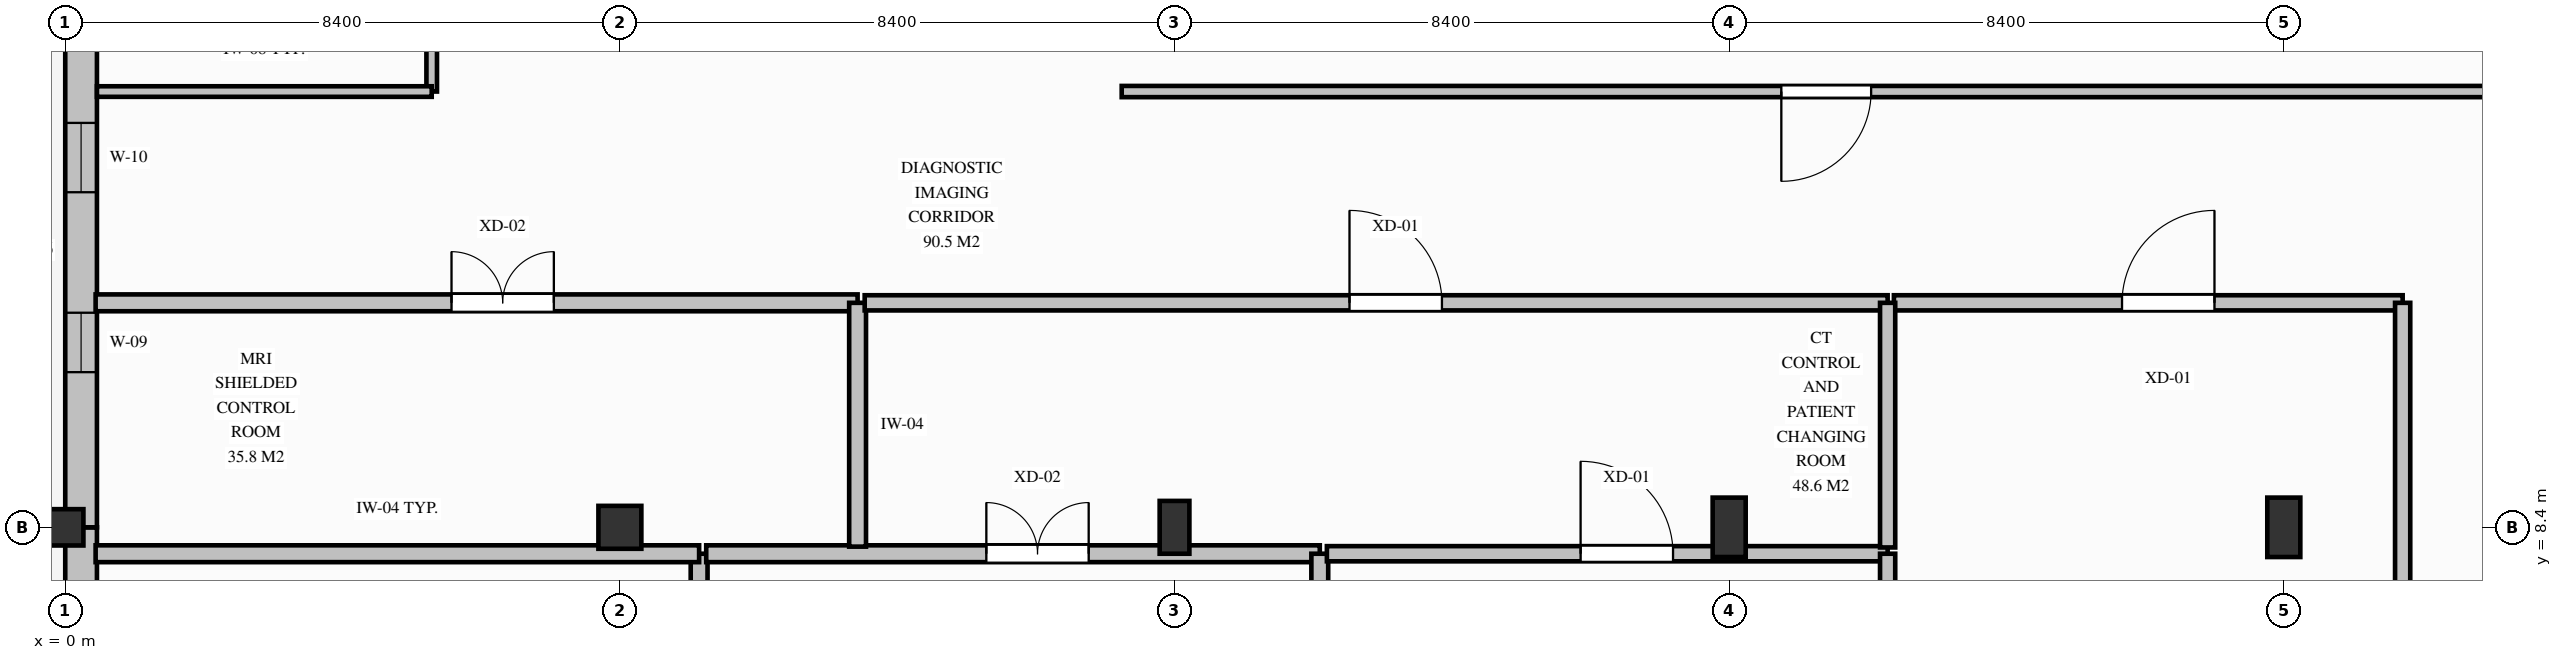
"""IFC4 building model, lengths in metres.
Left out: names, types, materials, properties, quantities, classifications, styles, units other than length and angle.
Written with IfcOpenShell. Run it as: python <this file> out.ifc"""

import sys

from ifc_helpers import new_model, si_unit, direction, frame, frame_2d, origin, origin_2d, place, context, subcontext, project, spatial, rectangle, circle, extrude, element, fill, save


model = new_model("IFC4")
c1 = context("Model", 3, precision=1e-05, world=origin(), true_north=direction((0.0, 1.0)))
c2 = subcontext(c1, "Body", "Model", "MODEL_VIEW")
j1 = project(units=[si_unit("LENGTHUNIT", "METRE"), si_unit("PLANEANGLEUNIT", "RADIAN")], contexts=[c1])
p1 = place(None, origin())
s1 = spatial("IfcSite", under=j1, at=p1, CompositionType="ELEMENT")
p2 = place(p1, origin())
s2 = spatial("IfcBuilding", under=s1, at=p2, CompositionType="ELEMENT")
p3 = place(p2, origin())
s3 = spatial("IfcBuildingStorey", under=s2, at=p3, CompositionType="ELEMENT", Elevation=0.0)
p4 = place(p3, frame((0.0, 8.4, 0.0), z_axis=(0.0, 0.0, 1.0), x_axis=(1.0, 0.0, 0.0)))
e1 = element("IfcColumn", 1, at=p4, inside=s3, PredefinedType="COLUMN", context=c2, shape_type="SweptSolid", body=[
    extrude(circle(Radius=0.275, at=origin_2d()), origin(), (0.0, 0.0, 1.0), 4.5),
])
p5 = place(p3, frame((8.4, 8.4, 0.0), z_axis=(0.0, 0.0, 1.0), x_axis=(1.0, 0.0, 0.0)))
e2 = element("IfcColumn", 2, at=p5, inside=s3, PredefinedType="COLUMN", context=c2, shape_type="SweptSolid", body=[
    extrude(circle(Radius=0.325, at=origin_2d()), origin(), (0.0, 0.0, 1.0), 4.5),
])
p6 = place(p3, frame((16.8, 8.4, 0.0), z_axis=(0.0, 0.0, 1.0), x_axis=(1.0, 0.0, 0.0)))
e3 = element("IfcColumn", 3, at=p6, inside=s3, PredefinedType="COLUMN", context=c2, shape_type="SweptSolid", body=[
    extrude(rectangle(XDim=0.45, YDim=0.8, at=origin_2d()), origin(), (0.0, 0.0, 1.0), 4.5),
])
for number, where, z_axis, x_axis in (
    (4, (25.2, 8.4, 0.0), (0.0, 0.0, 1.0), (1.0, 0.0, 0.0)),
    (5, (33.6, 8.4, 0.0), (0.0, 0.0, 1.0), (1.0, 0.0, 0.0)),
):
    element("IfcColumn", number, at=place(p3, frame(where, z_axis=z_axis, x_axis=x_axis)), inside=s3, PredefinedType="COLUMN", context=c2, shape_type="SweptSolid", body=[
        extrude(rectangle(XDim=0.5, YDim=0.9, at=origin_2d()), origin(), (0.0, 0.0, 1.0), 4.5),
    ])
p7 = place(p3, frame((0.24, 0.0, 0.0), z_axis=(0.0, 0.0, 1.0), x_axis=(0.0, 1.0, 0.0)))
e6 = element("IfcWall", 6, at=p7, inside=s3, PredefinedType="SOLIDWALL", context=c2, shape_type="SweptSolid", body=[
    extrude(rectangle(XDim=8.4, YDim=0.48, at=frame_2d((4.2, 0.0))), origin(), (0.0, 0.0, 1.0), 2.828),
])
p8 = place(p7, frame((2.35, 0.0, 0.85)))
e7 = element("IfcOpeningElement", 7, at=p8, cuts=e6, PredefinedType="OPENING", context=c2, shape_type="SweptSolid", body=[
    extrude(rectangle(XDim=0.9, YDim=1.8, at=frame_2d((0.45, 0.9))), frame((0.0, 0.25, 0.0), z_axis=(0.0, -1.0, 0.0), x_axis=(1.0, 0.0, 0.0)), (0.0, 0.0, 1.0), 0.5),
])
p9 = place(p7, frame((5.075, 0.0, 0.85)))
e8 = element("IfcOpeningElement", 8, at=p9, cuts=e6, PredefinedType="OPENING", context=c2, shape_type="SweptSolid", body=[
    extrude(rectangle(XDim=1.05, YDim=1.75, at=frame_2d((0.525, 0.875))), frame((0.0, 0.25, 0.0), z_axis=(0.0, -1.0, 0.0), x_axis=(1.0, 0.0, 0.0)), (0.0, 0.0, 1.0), 0.5),
])
p10 = place(p3, frame((0.24, 8.4, 0.0), z_axis=(0.0, 0.0, 1.0), x_axis=(0.0, 1.0, 0.0)))
e9 = element("IfcWall", 9, at=p10, inside=s3, PredefinedType="SOLIDWALL", context=c2, shape_type="SweptSolid", body=[
    extrude(rectangle(XDim=8.4, YDim=0.48, at=frame_2d((4.2, 0.0))), origin(), (0.0, 0.0, 1.0), 3.773),
])
p11 = place(p10, frame((2.35, 0.0, 0.85)))
e10 = element("IfcOpeningElement", 10, at=p11, cuts=e9, PredefinedType="OPENING", context=c2, shape_type="SweptSolid", body=[
    extrude(rectangle(XDim=0.9, YDim=1.8, at=frame_2d((0.45, 0.9))), frame((0.0, 0.25, 0.0), z_axis=(0.0, -1.0, 0.0), x_axis=(1.0, 0.0, 0.0)), (0.0, 0.0, 1.0), 0.5),
])
p12 = place(p10, frame((5.075, 0.0, 0.85)))
e11 = element("IfcOpeningElement", 11, at=p12, cuts=e9, PredefinedType="OPENING", context=c2, shape_type="SweptSolid", body=[
    extrude(rectangle(XDim=1.05, YDim=1.75, at=frame_2d((0.525, 0.875))), frame((0.0, 0.25, 0.0), z_axis=(0.0, -1.0, 0.0), x_axis=(1.0, 0.0, 0.0)), (0.0, 0.0, 1.0), 0.5),
])
p13 = place(p3, frame((41.4, 8.4, 0.0), z_axis=(0.0, 0.0, 1.0), x_axis=(-0.680446197767, -0.732798043082, 0.0)))
e12 = element("IfcWall", 12, at=p13, inside=s3, PredefinedType="SOLIDWALL", context=c2, shape_type="SweptSolid", body=[
    extrude(rectangle(XDim=11.463, YDim=0.42, at=frame_2d((5.731, 0.0))), origin(), (0.0, 0.0, 1.0), 2.828),
])
p14 = place(p13, frame((3.121, 0.0, 0.85)))
e13 = element("IfcOpeningElement", 13, at=p14, cuts=e12, PredefinedType="OPENING", context=c2, shape_type="SweptSolid", body=[
    extrude(rectangle(XDim=1.4, YDim=1.65, at=frame_2d((0.7, 0.825))), frame((0.0, 0.22, 0.0), z_axis=(0.0, -1.0, 0.0), x_axis=(1.0, 0.0, 0.0)), (0.0, 0.0, 1.0), 0.44),
])
p15 = place(p13, frame((6.792, 0.0, 0.85)))
e14 = element("IfcOpeningElement", 14, at=p15, cuts=e12, PredefinedType="OPENING", context=c2, shape_type="SweptSolid", body=[
    extrude(rectangle(XDim=1.7, YDim=1.75, at=frame_2d((0.85, 0.875))), frame((0.0, 0.22, 0.0), z_axis=(0.0, -1.0, 0.0), x_axis=(1.0, 0.0, 0.0)), (0.0, 0.0, 1.0), 0.44),
])
p16 = place(p3, frame((9.6, 8.0, 0.0), z_axis=(0.0, 0.0, 1.0), x_axis=(0.0, -1.0, 0.0)))
e15 = element("IfcWall", 15, at=p16, inside=s3, PredefinedType="PARTITIONING", context=c2, shape_type="SweptSolid", body=[
    extrude(rectangle(XDim=7.54, YDim=0.255, at=frame_2d((3.77, 0.0))), origin(), (0.0, 0.0, 1.0), 3.913),
])
p17 = place(p16, frame((3.05, 0.0, 0.0)))
e16 = element("IfcOpeningElement", 16, at=p17, cuts=e15, PredefinedType="OPENING", context=c2, shape_type="SweptSolid", body=[
    extrude(rectangle(XDim=1.55, YDim=2.22, at=frame_2d((0.775, 1.11))), frame((0.0, 0.137, 0.0), z_axis=(0.0, -1.0, 0.0), x_axis=(1.0, 0.0, 0.0)), (0.0, 0.0, 1.0), 0.275),
])
p18 = place(p3, frame((0.46, 8.0, 0.0), z_axis=(0.0, 0.0, 1.0), x_axis=(1.0, 0.0, 0.0)))
e17 = element("IfcWall", 17, at=p18, inside=s3, PredefinedType="PARTITIONING", context=c2, shape_type="SweptSolid", body=[
    extrude(rectangle(XDim=9.14, YDim=0.255, at=frame_2d((4.57, 0.0))), origin(), (0.0, 0.0, 1.0), 3.873),
])
p19 = place(p3, frame((9.708, 8.0, 0.0), z_axis=(0.0, 0.0, 1.0), x_axis=(1.0, 0.0, 0.0)))
e18 = element("IfcWall", 18, at=p19, inside=s3, PredefinedType="PARTITIONING", context=c2, shape_type="SweptSolid", body=[
    extrude(rectangle(XDim=9.292, YDim=0.255, at=frame_2d((4.646, 0.0))), origin(), (0.0, 0.0, 1.0), 3.763),
])
p20 = place(p19, frame((4.242, 0.0, 0.0)))
e19 = element("IfcOpeningElement", 19, at=p20, cuts=e18, PredefinedType="OPENING", context=c2, shape_type="SweptSolid", body=[
    extrude(rectangle(XDim=1.55, YDim=2.22, at=frame_2d((0.775, 1.11))), frame((0.0, 0.137, 0.0), z_axis=(0.0, -1.0, 0.0), x_axis=(1.0, 0.0, 0.0)), (0.0, 0.0, 1.0), 0.275),
])
p21 = place(p3, frame((19.0, 8.0, 0.0), z_axis=(0.0, 0.0, 1.0), x_axis=(0.0, -1.0, 0.0)))
e20 = element("IfcWall", 20, at=p21, inside=s3, PredefinedType="PARTITIONING", context=c2, shape_type="SweptSolid", body=[
    extrude(rectangle(XDim=7.54, YDim=0.255, at=frame_2d((3.77, 0.0))), origin(), (0.0, 0.0, 1.0), 3.973),
])
p22 = place(p3, frame((0.46, 11.8, 0.0), z_axis=(0.0, 0.0, 1.0), x_axis=(1.0, 0.0, 0.0)))
e21 = element("IfcWall", 21, at=p22, inside=s3, PredefinedType="PARTITIONING", context=c2, shape_type="SweptSolid", body=[
    extrude(rectangle(XDim=11.54, YDim=0.255, at=frame_2d((5.77, 0.0))), origin(), (0.0, 0.0, 1.0), 3.913),
])
p23 = place(p22, frame((5.39, 0.0, 0.0)))
e22 = element("IfcOpeningElement", 22, at=p23, cuts=e21, PredefinedType="OPENING", context=c2, shape_type="SweptSolid", body=[
    extrude(rectangle(XDim=1.55, YDim=2.22, at=frame_2d((0.775, 1.11))), frame((0.0, 0.137, 0.0), z_axis=(0.0, -1.0, 0.0), x_axis=(1.0, 0.0, 0.0)), (0.0, 0.0, 1.0), 0.275),
])
p24 = place(p3, frame((12.0, 11.8, 0.0), z_axis=(0.0, 0.0, 1.0), x_axis=(0.0, -1.0, 0.0)))
e23 = element("IfcWall", 23, at=p24, inside=s3, PredefinedType="PARTITIONING", context=c2, shape_type="SweptSolid", body=[
    extrude(rectangle(XDim=3.693, YDim=0.255, at=frame_2d((1.846, 0.0))), origin(), (0.0, 0.0, 1.0), 3.823),
])
p25 = place(p3, frame((19.107, 8.0, 0.0), z_axis=(0.0, 0.0, 1.0), x_axis=(1.0, 0.0, 0.0)))
e24 = element("IfcWall", 24, at=p25, inside=s3, PredefinedType="PARTITIONING", context=c2, shape_type="SweptSolid", body=[
    extrude(rectangle(XDim=8.493, YDim=0.23, at=frame_2d((4.246, 0.0))), origin(), (0.0, 0.0, 1.0), 3.663),
])
p26 = place(p25, frame((3.843, 0.0, 0.0)))
e25 = element("IfcOpeningElement", 25, at=p26, cuts=e24, PredefinedType="OPENING", context=c2, shape_type="SweptSolid", body=[
    extrude(rectangle(XDim=1.4, YDim=2.2, at=frame_2d((0.7, 1.1))), frame((0.0, 0.125, 0.0), z_axis=(0.0, -1.0, 0.0), x_axis=(1.0, 0.0, 0.0)), (0.0, 0.0, 1.0), 0.25),
])
p27 = place(p3, frame((27.6, 8.0, 0.0), z_axis=(0.0, 0.0, 1.0), x_axis=(0.0, -1.0, 0.0)))
e26 = element("IfcWall", 26, at=p27, inside=s3, PredefinedType="PARTITIONING", context=c2, shape_type="SweptSolid", body=[
    extrude(rectangle(XDim=7.54, YDim=0.23, at=frame_2d((3.77, 0.0))), origin(), (0.0, 0.0, 1.0), 4.23),
])
p28 = place(p3, frame((27.695, 11.8, 0.0), z_axis=(0.0, 0.0, 1.0), x_axis=(1.0, 0.0, 0.0)))
e27 = element("IfcWall", 27, at=p28, inside=s3, PredefinedType="PARTITIONING", context=c2, shape_type="SweptSolid", body=[
    extrude(rectangle(XDim=7.705, YDim=0.23, at=frame_2d((3.853, 0.0))), origin(), (0.0, 0.0, 1.0), 3.813),
])
p29 = place(p28, frame((3.455, 0.0, 0.0)))
e28 = element("IfcOpeningElement", 28, at=p29, cuts=e27, PredefinedType="OPENING", context=c2, shape_type="SweptSolid", body=[
    extrude(rectangle(XDim=1.4, YDim=2.2, at=frame_2d((0.7, 1.1))), frame((0.0, 0.125, 0.0), z_axis=(0.0, -1.0, 0.0), x_axis=(1.0, 0.0, 0.0)), (0.0, 0.0, 1.0), 0.25),
])
p30 = place(p3, frame((35.4, 11.8, 0.0), z_axis=(0.0, 0.0, 1.0), x_axis=(0.0, -1.0, 0.0)))
e29 = element("IfcWall", 29, at=p30, inside=s3, PredefinedType="PARTITIONING", context=c2, shape_type="SweptSolid", body=[
    extrude(rectangle(XDim=7.6, YDim=0.23, at=frame_2d((3.8, 0.0))), origin(), (0.0, 0.0, 1.0), 3.913),
])
p31 = place(p3, frame((12.107, 11.8, 0.0), z_axis=(0.0, 0.0, 1.0), x_axis=(1.0, 0.0, 0.0)))
e30 = element("IfcWall", 30, at=p31, inside=s3, PredefinedType="PARTITIONING", context=c2, shape_type="SweptSolid", body=[
    extrude(rectangle(XDim=15.493, YDim=0.23, at=frame_2d((7.746, 0.0))), origin(), (0.0, 0.0, 1.0), 3.613),
])
p32 = place(p31, frame((7.343, 0.0, 0.0)))
e31 = element("IfcOpeningElement", 31, at=p32, cuts=e30, PredefinedType="OPENING", context=c2, shape_type="SweptSolid", body=[
    extrude(rectangle(XDim=1.4, YDim=2.2, at=frame_2d((0.7, 1.1))), frame((0.0, 0.125, 0.0), z_axis=(0.0, -1.0, 0.0), x_axis=(1.0, 0.0, 0.0)), (0.0, 0.0, 1.0), 0.25),
])
p33 = place(p3, frame((27.6, 11.8, 0.0), z_axis=(0.0, 0.0, 1.0), x_axis=(0.0, -1.0, 0.0)))
e32 = element("IfcWall", 32, at=p33, inside=s3, PredefinedType="PARTITIONING", context=c2, shape_type="SweptSolid", body=[
    extrude(rectangle(XDim=3.705, YDim=0.23, at=frame_2d((1.853, 0.0))), origin(), (0.0, 0.0, 1.0), 3.943),
])
p34 = place(p3, frame((37.6, 15.0, 0.0), z_axis=(0.0, 0.0, 1.0), x_axis=(-1.0, 0.0, 0.0)))
e33 = element("IfcWall", 33, at=p34, inside=s3, PredefinedType="PARTITIONING", context=c2, shape_type="SweptSolid", body=[
    extrude(rectangle(XDim=21.6, YDim=0.17, at=frame_2d((10.8, 0.0))), origin(), (0.0, 0.0, 1.0), 3.613),
])
p35 = place(p34, frame((10.25, 0.0, 0.0)))
e34 = element("IfcOpeningElement", 34, at=p35, cuts=e33, PredefinedType="OPENING", context=c2, shape_type="SweptSolid", body=[
    extrude(rectangle(XDim=1.36, YDim=2.2, at=frame_2d((0.68, 1.1))), frame((0.0, 0.095, 0.0), z_axis=(0.0, -1.0, 0.0), x_axis=(1.0, 0.0, 0.0)), (0.0, 0.0, 1.0), 0.19),
])
p36 = place(p3, frame((5.55, 15.0, 0.0), z_axis=(0.0, 0.0, 1.0), x_axis=(0.0, 1.0, 0.0)))
e35 = element("IfcWall", 35, at=p36, inside=s3, PredefinedType="PARTITIONING", context=c2, shape_type="SweptSolid", body=[
    extrude(rectangle(XDim=9.6, YDim=0.16, at=frame_2d((4.8, 0.0))), origin(), (0.0, 0.0, 1.0), 3.943),
])
p37 = place(p36, frame((4.25, 0.0, 0.0)))
e36 = element("IfcOpeningElement", 36, at=p37, cuts=e35, PredefinedType="OPENING", context=c2, shape_type="SweptSolid", body=[
    extrude(rectangle(XDim=1.02, YDim=2.15, at=frame_2d((0.51, 1.075))), frame((0.0, 0.09, 0.0), z_axis=(0.0, -1.0, 0.0), x_axis=(1.0, 0.0, 0.0)), (0.0, 0.0, 1.0), 0.18),
])
p38 = place(p3, frame((0.48, 15.0, 0.0), z_axis=(0.0, 0.0, 1.0), x_axis=(1.0, 0.0, 0.0)))
e37 = element("IfcWall", 37, at=p38, inside=s3, PredefinedType="PARTITIONING", context=c2, shape_type="SweptSolid", body=[
    extrude(rectangle(XDim=5.07, YDim=0.16, at=frame_2d((2.535, 0.0))), origin(), (0.0, 0.0, 1.0), 4.23),
])
p39 = place(p11, origin())
e38 = element("IfcWindow", 38, at=p39, inside=s3, PartitioningType="SINGLE_PANEL", PredefinedType="WINDOW", context=c2, shape_type="SweptSolid", body=[
    extrude(rectangle(XDim=0.9, YDim=1.8, at=frame_2d((0.45, 0.9))), frame((0.0, 0.03, 0.0), z_axis=(0.0, -1.0, 0.0), x_axis=(1.0, 0.0, 0.0)), (0.0, 0.0, 1.0), 0.06),
])
fill(e10, e38)
p40 = place(p12, origin())
e39 = element("IfcWindow", 39, at=p40, inside=s3, PartitioningType="SINGLE_PANEL", PredefinedType="WINDOW", context=c2, shape_type="SweptSolid", body=[
    extrude(rectangle(XDim=1.05, YDim=1.75, at=frame_2d((0.525, 0.875))), frame((0.0, 0.03, 0.0), z_axis=(0.0, -1.0, 0.0), x_axis=(1.0, 0.0, 0.0)), (0.0, 0.0, 1.0), 0.06),
])
fill(e11, e39)
p41 = place(p20, origin())
e40 = element("IfcDoor", 40, at=p41, inside=s3, OperationType="DOUBLE_DOOR_SINGLE_SWING", PredefinedType="DOOR", context=c2, shape_type="SweptSolid", body=[
    extrude(rectangle(XDim=1.55, YDim=2.22, at=frame_2d((0.775, 1.11))), frame((0.0, 0.025, 0.0), z_axis=(0.0, -1.0, 0.0), x_axis=(1.0, 0.0, 0.0)), (0.0, 0.0, 1.0), 0.05),
])
fill(e19, e40)
p42 = place(p23, origin())
e41 = element("IfcDoor", 41, at=p42, inside=s3, OperationType="DOUBLE_DOOR_SINGLE_SWING", PredefinedType="DOOR", context=c2, shape_type="SweptSolid", body=[
    extrude(rectangle(XDim=1.55, YDim=2.22, at=frame_2d((0.775, 1.11))), frame((0.0, 0.025, 0.0), z_axis=(0.0, -1.0, 0.0), x_axis=(1.0, 0.0, 0.0)), (0.0, 0.0, 1.0), 0.05),
])
fill(e22, e41)
p43 = place(p26, origin())
e42 = element("IfcDoor", 42, at=p43, inside=s3, OperationType="SINGLE_SWING_LEFT", PredefinedType="DOOR", context=c2, shape_type="SweptSolid", body=[
    extrude(rectangle(XDim=1.4, YDim=2.2, at=frame_2d((0.7, 1.1))), frame((0.0, 0.025, 0.0), z_axis=(0.0, -1.0, 0.0), x_axis=(1.0, 0.0, 0.0)), (0.0, 0.0, 1.0), 0.05),
])
fill(e25, e42)
p44 = place(p29, origin())
e43 = element("IfcDoor", 43, at=p44, inside=s3, OperationType="SINGLE_SWING_RIGHT", PredefinedType="DOOR", context=c2, shape_type="SweptSolid", body=[
    extrude(rectangle(XDim=1.4, YDim=2.2, at=frame_2d((0.7, 1.1))), frame((0.0, 0.025, 0.0), z_axis=(0.0, -1.0, 0.0), x_axis=(1.0, 0.0, 0.0)), (0.0, 0.0, 1.0), 0.05),
])
fill(e28, e43)
p45 = place(p32, origin())
e44 = element("IfcDoor", 44, at=p45, inside=s3, OperationType="SINGLE_SWING_LEFT", PredefinedType="DOOR", context=c2, shape_type="SweptSolid", body=[
    extrude(rectangle(XDim=1.4, YDim=2.2, at=frame_2d((0.7, 1.1))), frame((0.0, 0.025, 0.0), z_axis=(0.0, -1.0, 0.0), x_axis=(1.0, 0.0, 0.0)), (0.0, 0.0, 1.0), 0.05),
])
fill(e31, e44)
p46 = place(p35, origin())
e45 = element("IfcDoor", 45, at=p46, inside=s3, OperationType="SINGLE_SWING_RIGHT", PredefinedType="DOOR", context=c2, shape_type="SweptSolid", body=[
    extrude(rectangle(XDim=1.36, YDim=2.2, at=frame_2d((0.68, 1.1))), frame((0.0, 0.025, 0.0), z_axis=(0.0, -1.0, 0.0), x_axis=(1.0, 0.0, 0.0)), (0.0, 0.0, 1.0), 0.05),
])
fill(e34, e45)
save(model, sys.argv[1])
